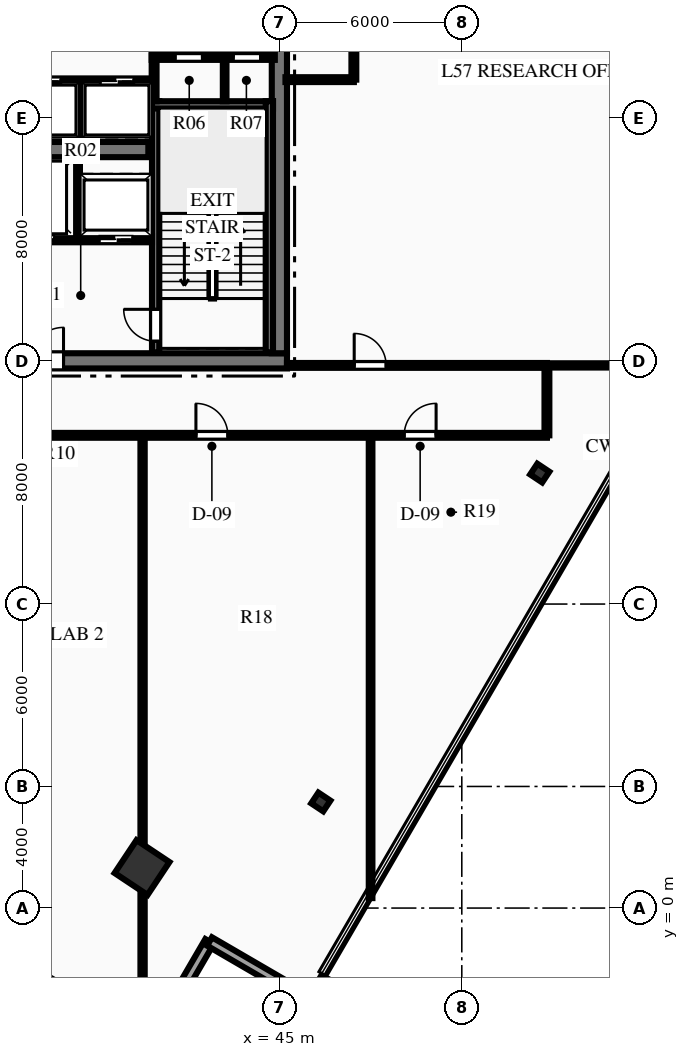
"""IFC4 building model, lengths in metres.
Left out: names, types, materials, properties, quantities, classifications, styles, units other than length and angle.
Written with IfcOpenShell. Run it as: python <this file> out.ifc"""

import sys

from ifc_helpers import new_model, si_unit, direction, frame, frame_2d, origin, origin_2d, place, context, subcontext, project, spatial, rectangle, hollow_rectangle, i_section, extrude, element, fill, save


model = new_model("IFC4")
c1 = context("Model", 3, precision=1e-05, world=origin(), true_north=direction((0.0, 1.0)))
c2 = subcontext(c1, "Body", "Model", "MODEL_VIEW")
j1 = project(units=[si_unit("LENGTHUNIT", "METRE"), si_unit("PLANEANGLEUNIT", "RADIAN")], contexts=[c1])
p1 = place(None, origin())
s1 = spatial("IfcSite", under=j1, at=p1, CompositionType="ELEMENT")
p2 = place(p1, origin())
s2 = spatial("IfcBuilding", under=s1, at=p2, CompositionType="ELEMENT")
p3 = place(p2, frame((0.0, 0.0, 228.45)))
s3 = spatial("IfcBuildingStorey", under=s2, at=p3, CompositionType="ELEMENT", Elevation=228.45)
p4 = place(p3, frame((26.75, 18.0, 0.0), z_axis=(0.0, 0.0, 1.0), x_axis=(1.0, 0.0, 0.0)))
e1 = element("IfcWall", 1, at=p4, inside=s3, PredefinedType="SHEAR", context=c2, shape_type="SweptSolid", body=[
    extrude(rectangle(XDim=18.5, YDim=0.5, at=frame_2d((9.25, 0.0))), origin(), (0.0, 0.0, 1.0), 3.75),
])
p5 = place(p4, frame((7.35, 0.0, 0.0)))
e2 = element("IfcOpeningElement", 2, at=p5, cuts=e1, PredefinedType="OPENING", context=c2, shape_type="SweptSolid", body=[
    extrude(rectangle(XDim=1.1, YDim=2.15, at=frame_2d((0.55, 1.075))), frame((0.0, 0.26, 0.0), z_axis=(0.0, -1.0, 0.0), x_axis=(1.0, 0.0, 0.0)), (0.0, 0.0, 1.0), 0.52),
])
p6 = place(p4, frame((10.05, 0.0, 0.0)))
e3 = element("IfcOpeningElement", 3, at=p6, cuts=e1, PredefinedType="OPENING", context=c2, shape_type="SweptSolid", body=[
    extrude(rectangle(XDim=1.1, YDim=2.15, at=frame_2d((0.55, 1.075))), frame((0.0, 0.26, 0.0), z_axis=(0.0, -1.0, 0.0), x_axis=(1.0, 0.0, 0.0)), (0.0, 0.0, 1.0), 0.52),
])
p7 = place(p3, frame((45.0, 18.25, 0.0), z_axis=(0.0, 0.0, 1.0), x_axis=(0.0, 1.0, 0.0)))
e4 = element("IfcWall", 4, at=p7, inside=s3, PredefinedType="SHEAR", context=c2, shape_type="SweptSolid", body=[
    extrude(rectangle(XDim=15.5, YDim=0.5, at=frame_2d((7.75, 0.0))), origin(), (0.0, 0.0, 1.0), 3.75),
])
p8 = place(p7, frame((9.99, 0.0, 0.0)))
e5 = element("IfcOpeningElement", 5, at=p8, cuts=e4, PredefinedType="OPENING", context=c2, shape_type="SweptSolid", body=[
    extrude(rectangle(XDim=1.4, YDim=2.2, at=frame_2d((0.7, 1.1))), frame((0.0, 0.26, 0.0), z_axis=(0.0, -1.0, 0.0), x_axis=(1.0, 0.0, 0.0)), (0.0, 0.0, 1.0), 0.52),
])
p9 = place(p3, frame((31.31, 24.95, 0.0), z_axis=(0.0, 0.0, 1.0), x_axis=(1.0, 0.0, 0.0)))
e6 = element("IfcWall", 6, at=p9, inside=s3, PredefinedType="SHEAR", context=c2, shape_type="SweptSolid", body=[
    extrude(rectangle(XDim=9.38, YDim=0.5, at=frame_2d((4.69, 0.0))), origin(), (0.0, 0.0, 1.0), 3.75),
])
p10 = place(p3, frame((40.93, 18.28, 0.0), z_axis=(0.0, 0.0, 1.0), x_axis=(0.0, 1.0, 0.0)))
e7 = element("IfcWall", 7, at=p10, inside=s3, PredefinedType="SHEAR", context=c2, shape_type="SweptSolid", body=[
    extrude(rectangle(XDim=8.26, YDim=0.24, at=frame_2d((4.13, 0.0))), origin(), (0.0, 0.0, 1.0), 3.75),
])
p11 = place(p10, frame((0.365, 0.0, 0.0)))
e8 = element("IfcOpeningElement", 8, at=p11, cuts=e7, PredefinedType="OPENING", context=c2, shape_type="SweptSolid", body=[
    extrude(rectangle(XDim=1.05, YDim=2.15, at=frame_2d((0.525, 1.075))), frame((0.0, 0.13, 0.0), z_axis=(0.0, -1.0, 0.0), x_axis=(1.0, 0.0, 0.0)), (0.0, 0.0, 1.0), 0.26),
])
p12 = place(p3, frame((40.81, 26.42, 0.0), z_axis=(0.0, 0.0, 1.0), x_axis=(1.0, 0.0, 0.0)))
e9 = element("IfcWall", 9, at=p12, inside=s3, PredefinedType="SHEAR", context=c2, shape_type="SweptSolid", body=[
    extrude(rectangle(XDim=3.98, YDim=0.24, at=frame_2d((1.99, 0.0))), origin(), (0.0, 0.0, 1.0), 3.75),
])
p13 = place(p3, frame((44.67, 18.28, 0.0), z_axis=(0.0, 0.0, 1.0), x_axis=(0.0, 1.0, 0.0)))
e10 = element("IfcWall", 10, at=p13, inside=s3, PredefinedType="SHEAR", context=c2, shape_type="SweptSolid", body=[
    extrude(rectangle(XDim=8.26, YDim=0.24, at=frame_2d((4.13, 0.0))), origin(), (0.0, 0.0, 1.0), 3.75),
])
p14 = place(p3, frame((40.483, 1.333, 0.0), z_axis=(0.0, 0.0, 1.0), x_axis=(0.554118199338, 0.832437998389, 0.0)))
e11 = element("IfcColumn", 11, at=p14, inside=s3, PredefinedType="COLUMN", context=c2, shape_type="SweptSolid", body=[
    extrude(hollow_rectangle(XDim=1.3, YDim=1.3, WallThickness=0.06, at=origin_2d()), origin(), (0.0, 0.0, 1.0), 3.75),
])
for number, where, z_axis, x_axis in (
    (12, (46.363, 3.49, 0.0), (0.0, 0.0, 1.0), (0.554, 0.832, 0.0)),
    (13, (53.564, 14.308, 0.0), (0.0, 0.0, 1.0), (0.554, 0.832, 0.0)),
):
    element("IfcColumn", number, at=place(p3, frame(where, z_axis=z_axis, x_axis=x_axis)), inside=s3, PredefinedType="COLUMN", context=c2, shape_type="SweptSolid", body=[
        extrude(i_section(OverallWidth=0.424, OverallDepth=0.474, WebThickness=0.048, FlangeThickness=0.077, at=origin_2d()), origin(), (0.0, 0.0, 1.0), 3.75),
    ])
p15 = place(p3, frame((46.526, -2.284, 0.0), z_axis=(0.0, 0.0, 1.0), x_axis=(-0.502959906984, -0.86430974307, 0.0)))
e14 = element("IfcWall", 14, at=p15, inside=s3, PredefinedType="STANDARD", context=c2, shape_type="SweptSolid", body=[
    extrude(rectangle(XDim=0.9, YDim=0.32, at=frame_2d((0.45, 0.0))), origin(), (0.0, 0.0, 1.0), 3.47),
])
p16 = place(p3, frame((42.703, -1.1, 0.0), z_axis=(0.0, 0.0, 1.0), x_axis=(-0.503006671867, -0.864282527914, 0.0)))
e15 = element("IfcWall", 15, at=p16, inside=s3, PredefinedType="STANDARD", context=c2, shape_type="SweptSolid", body=[
    extrude(rectangle(XDim=3.9, YDim=0.32, at=frame_2d((1.95, 0.0))), origin(), (0.0, 0.0, 1.0), 3.47),
])
p17 = place(p3, frame((46.074, -3.062, 0.0), z_axis=(0.0, 0.0, 1.0), x_axis=(-0.86427115238, 0.503026217174, 0.0)))
e16 = element("IfcWall", 16, at=p17, inside=s3, PredefinedType="STANDARD", context=c2, shape_type="SweptSolid", body=[
    extrude(rectangle(XDim=3.9, YDim=0.32, at=frame_2d((1.95, 0.0))), origin(), (0.0, 0.0, 1.0), 3.47),
])
p18 = place(p3, frame((36.12, 22.0, 0.0), z_axis=(0.0, 0.0, 1.0), x_axis=(1.0, 0.0, 0.0)))
e17 = element("IfcWall", 17, at=p18, inside=s3, PredefinedType="PARTITIONING", context=c2, shape_type="SweptSolid", body=[
    extrude(rectangle(XDim=4.69, YDim=0.2, at=frame_2d((2.345, 0.0))), origin(), (0.0, 0.0, 1.0), 3.47),
])
p19 = place(p18, frame((2.955, 0.0, 0.0)))
e18 = element("IfcOpeningElement", 18, at=p19, cuts=e17, PredefinedType="OPENING", context=c2, shape_type="SweptSolid", body=[
    extrude(rectangle(XDim=1.1, YDim=2.15, at=frame_2d((0.55, 1.075))), frame((0.0, 0.11, 0.0), z_axis=(0.0, -1.0, 0.0), x_axis=(1.0, 0.0, 0.0)), (0.0, 0.0, 1.0), 0.22),
])
p20 = place(p18, frame((0.08, 0.0, 0.0)))
e19 = element("IfcOpeningElement", 19, at=p20, cuts=e17, PredefinedType="OPENING", context=c2, shape_type="SweptSolid", body=[
    extrude(rectangle(XDim=1.4, YDim=2.2, at=frame_2d((0.7, 1.1))), frame((0.0, 0.11, 0.0), z_axis=(0.0, -1.0, 0.0), x_axis=(1.0, 0.0, 0.0)), (0.0, 0.0, 1.0), 0.22),
])
p21 = place(p3, frame((38.35, 22.05, 0.0), z_axis=(0.0, 0.0, 1.0), x_axis=(0.0, 1.0, 0.0)))
e20 = element("IfcWall", 20, at=p21, inside=s3, PredefinedType="PARTITIONING", context=c2, shape_type="SweptSolid", body=[
    extrude(rectangle(XDim=2.6, YDim=0.18, at=frame_2d((1.3, 0.0))), origin(), (0.0, 0.0, 1.0), 3.47),
])
p22 = place(p3, frame((40.8, 27.98, 0.0), z_axis=(0.0, 0.0, 1.0), x_axis=(1.0, 0.0, 0.0)))
e21 = element("IfcWall", 21, at=p22, inside=s3, PredefinedType="PARTITIONING", context=c2, shape_type="SweptSolid", body=[
    extrude(rectangle(XDim=4.05, YDim=0.16, at=frame_2d((2.025, 0.0))), origin(), (0.0, 0.0, 1.0), 3.47),
])
p23 = place(p22, frame((0.77, 0.0, 0.0)))
e22 = element("IfcOpeningElement", 22, at=p23, cuts=e21, PredefinedType="OPENING", context=c2, shape_type="SweptSolid", body=[
    extrude(rectangle(XDim=0.9, YDim=2.15, at=frame_2d((0.45, 1.075))), frame((0.0, 0.09, 0.0), z_axis=(0.0, -1.0, 0.0), x_axis=(1.0, 0.0, 0.0)), (0.0, 0.0, 1.0), 0.18),
])
p24 = place(p22, frame((2.68, 0.0, 0.0)))
e23 = element("IfcOpeningElement", 23, at=p24, cuts=e21, PredefinedType="OPENING", context=c2, shape_type="SweptSolid", body=[
    extrude(rectangle(XDim=0.9, YDim=2.15, at=frame_2d((0.45, 1.075))), frame((0.0, 0.09, 0.0), z_axis=(0.0, -1.0, 0.0), x_axis=(1.0, 0.0, 0.0)), (0.0, 0.0, 1.0), 0.18),
])
p25 = place(p3, frame((40.88, 26.54, 0.0), z_axis=(0.0, 0.0, 1.0), x_axis=(0.0, 1.0, 0.0)))
e24 = element("IfcWall", 24, at=p25, inside=s3, PredefinedType="PARTITIONING", context=c2, shape_type="SweptSolid", body=[
    extrude(rectangle(XDim=1.51, YDim=0.16, at=frame_2d((0.755, 0.0))), origin(), (0.0, 0.0, 1.0), 3.47),
])
p26 = place(p3, frame((43.2, 26.54, 0.0), z_axis=(0.0, 0.0, 1.0), x_axis=(0.0, 1.0, 0.0)))
e25 = element("IfcWall", 25, at=p26, inside=s3, PredefinedType="PARTITIONING", context=c2, shape_type="SweptSolid", body=[
    extrude(rectangle(XDim=1.44, YDim=0.12, at=frame_2d((0.72, 0.0))), origin(), (0.0, 0.0, 1.0), 3.47),
])
p27 = place(p3, frame((31.2, 27.2, 0.0), z_axis=(0.0, 0.0, 1.0), x_axis=(1.0, 0.0, 0.0)))
e26 = element("IfcWall", 26, at=p27, inside=s3, PredefinedType="PARTITIONING", context=c2, shape_type="SweptSolid", body=[
    extrude(rectangle(XDim=9.6, YDim=0.18, at=frame_2d((4.8, 0.0))), origin(), (0.0, 0.0, 1.0), 3.47),
])
p28 = place(p27, frame((0.59, 0.0, 0.0)))
e27 = element("IfcOpeningElement", 27, at=p28, cuts=e26, PredefinedType="OPENING", context=c2, shape_type="SweptSolid", body=[
    extrude(rectangle(XDim=1.1, YDim=2.15, at=frame_2d((0.55, 1.075))), frame((0.0, 0.1, 0.0), z_axis=(0.0, -1.0, 0.0), x_axis=(1.0, 0.0, 0.0)), (0.0, 0.0, 1.0), 0.2),
])
p29 = place(p27, frame((2.99, 0.0, 0.0)))
e28 = element("IfcOpeningElement", 28, at=p29, cuts=e26, PredefinedType="OPENING", context=c2, shape_type="SweptSolid", body=[
    extrude(rectangle(XDim=1.1, YDim=2.15, at=frame_2d((0.55, 1.075))), frame((0.0, 0.1, 0.0), z_axis=(0.0, -1.0, 0.0), x_axis=(1.0, 0.0, 0.0)), (0.0, 0.0, 1.0), 0.2),
])
p30 = place(p27, frame((5.51, 0.0, 0.0)))
e29 = element("IfcOpeningElement", 29, at=p30, cuts=e26, PredefinedType="OPENING", context=c2, shape_type="SweptSolid", body=[
    extrude(rectangle(XDim=1.1, YDim=2.15, at=frame_2d((0.55, 1.075))), frame((0.0, 0.1, 0.0), z_axis=(0.0, -1.0, 0.0), x_axis=(1.0, 0.0, 0.0)), (0.0, 0.0, 1.0), 0.2),
])
p31 = place(p27, frame((7.91, 0.0, 0.0)))
e30 = element("IfcOpeningElement", 30, at=p31, cuts=e26, PredefinedType="OPENING", context=c2, shape_type="SweptSolid", body=[
    extrude(rectangle(XDim=1.1, YDim=2.15, at=frame_2d((0.55, 1.075))), frame((0.0, 0.1, 0.0), z_axis=(0.0, -1.0, 0.0), x_axis=(1.0, 0.0, 0.0)), (0.0, 0.0, 1.0), 0.2),
])
p32 = place(p3, frame((38.46, 25.3, 0.0), z_axis=(0.0, 0.0, 1.0), x_axis=(0.0, 1.0, 0.0)))
e31 = element("IfcWall", 31, at=p32, inside=s3, PredefinedType="PARTITIONING", context=c2, shape_type="SweptSolid", body=[
    extrude(rectangle(XDim=1.9, YDim=0.18, at=frame_2d((0.95, 0.0))), origin(), (0.0, 0.0, 1.0), 3.47),
])
p33 = place(p3, frame((18.2, 15.55, 0.0), z_axis=(0.0, 0.0, 1.0), x_axis=(1.0, 0.0, 0.0)))
e32 = element("IfcWall", 32, at=p33, inside=s3, PredefinedType="PARTITIONING", context=c2, shape_type="SweptSolid", body=[
    extrude(rectangle(XDim=35.6, YDim=0.16, at=frame_2d((17.8, 0.0))), origin(), (0.0, 0.0, 1.0), 3.008),
])
p34 = place(p33, frame((3.587, 0.0, 0.0)))
e33 = element("IfcOpeningElement", 33, at=p34, cuts=e32, PredefinedType="OPENING", context=c2, shape_type="SweptSolid", body=[
    extrude(rectangle(XDim=1.05, YDim=2.15, at=frame_2d((0.525, 1.075))), frame((0.0, 0.09, 0.0), z_axis=(0.0, -1.0, 0.0), x_axis=(1.0, 0.0, 0.0)), (0.0, 0.0, 1.0), 0.18),
])
p35 = place(p33, frame((16.775, 0.0, 0.0)))
e34 = element("IfcOpeningElement", 34, at=p35, cuts=e32, PredefinedType="OPENING", context=c2, shape_type="SweptSolid", body=[
    extrude(rectangle(XDim=1.05, YDim=2.15, at=frame_2d((0.525, 1.075))), frame((0.0, 0.09, 0.0), z_axis=(0.0, -1.0, 0.0), x_axis=(1.0, 0.0, 0.0)), (0.0, 0.0, 1.0), 0.18),
])
p36 = place(p33, frame((24.055, 0.0, 0.0)))
e35 = element("IfcOpeningElement", 35, at=p36, cuts=e32, PredefinedType="OPENING", context=c2, shape_type="SweptSolid", body=[
    extrude(rectangle(XDim=1.05, YDim=2.15, at=frame_2d((0.525, 1.075))), frame((0.0, 0.09, 0.0), z_axis=(0.0, -1.0, 0.0), x_axis=(1.0, 0.0, 0.0)), (0.0, 0.0, 1.0), 0.18),
])
p37 = place(p33, frame((30.905, 0.0, 0.0)))
e36 = element("IfcOpeningElement", 36, at=p37, cuts=e32, PredefinedType="OPENING", context=c2, shape_type="SweptSolid", body=[
    extrude(rectangle(XDim=1.05, YDim=2.15, at=frame_2d((0.525, 1.075))), frame((0.0, 0.09, 0.0), z_axis=(0.0, -1.0, 0.0), x_axis=(1.0, 0.0, 0.0)), (0.0, 0.0, 1.0), 0.18),
])
p38 = place(p3, frame((45.25, 17.85, 0.0), z_axis=(0.0, 0.0, 1.0), x_axis=(1.0, 0.0, 0.0)))
e37 = element("IfcWall", 37, at=p38, inside=s3, PredefinedType="PARTITIONING", context=c2, shape_type="SweptSolid", body=[
    extrude(rectangle(XDim=8.55, YDim=0.16, at=frame_2d((4.275, 0.0))), origin(), (0.0, 0.0, 1.0), 3.47),
])
p39 = place(p38, frame((2.211, 0.0, 0.0)))
e38 = element("IfcOpeningElement", 38, at=p39, cuts=e37, PredefinedType="OPENING", context=c2, shape_type="SweptSolid", body=[
    extrude(rectangle(XDim=1.05, YDim=2.15, at=frame_2d((0.525, 1.075))), frame((0.0, 0.09, 0.0), z_axis=(0.0, -1.0, 0.0), x_axis=(1.0, 0.0, 0.0)), (0.0, 0.0, 1.0), 0.18),
])
p40 = place(p3, frame((47.45, 27.25, 0.0), z_axis=(0.0, 0.0, 1.0), x_axis=(0.0, 1.0, 0.0)))
e39 = element("IfcWall", 39, at=p40, inside=s3, PredefinedType="PARTITIONING", context=c2, shape_type="SweptSolid", body=[
    extrude(rectangle(XDim=6.9, YDim=0.16, at=frame_2d((3.45, 0.0))), origin(), (0.0, 0.0, 1.0), 3.47),
])
p41 = place(p3, frame((45.2, 27.25, 0.0), z_axis=(0.0, 0.0, 1.0), x_axis=(1.0, 0.0, 0.0)))
e40 = element("IfcWall", 40, at=p41, inside=s3, PredefinedType="PARTITIONING", context=c2, shape_type="SweptSolid", body=[
    extrude(rectangle(XDim=2.25, YDim=0.16, at=frame_2d((1.125, 0.0))), origin(), (0.0, 0.0, 1.0), 3.47),
])
p42 = place(p3, frame((53.8, 15.55, 0.0), z_axis=(0.0, 0.0, 1.0), x_axis=(0.0, 1.0, 0.0)))
e41 = element("IfcWall", 41, at=p42, inside=s3, PredefinedType="PARTITIONING", context=c2, shape_type="SweptSolid", body=[
    extrude(rectangle(XDim=2.3, YDim=0.16, at=frame_2d((1.15, 0.0))), origin(), (0.0, 0.0, 1.0), 3.47),
])
p43 = place(p3, frame((53.8, 17.85, 0.0), z_axis=(0.0, 0.0, 1.0), x_axis=(1.0, 0.0, 0.0)))
e42 = element("IfcWall", 42, at=p43, inside=s3, PredefinedType="PARTITIONING", context=c2, shape_type="SweptSolid", body=[
    extrude(rectangle(XDim=4.398, YDim=0.14, at=frame_2d((2.199, 0.0))), origin(), (0.0, 0.0, 1.0), 3.47),
])
p44 = place(p3, frame((40.5, -4.284, 0.0), z_axis=(0.0, 0.0, 1.0), x_axis=(0.0, 1.0, 0.0)))
e43 = element("IfcWall", 43, at=p44, inside=s3, PredefinedType="PARTITIONING", context=c2, shape_type="SweptSolid", body=[
    extrude(rectangle(XDim=19.834, YDim=0.14, at=frame_2d((9.917, 0.0))), origin(), (0.0, 0.0, 1.0), 2.849),
])
p45 = place(p3, frame((48.0, 0.327, 0.0), z_axis=(0.0, 0.0, 1.0), x_axis=(0.0, 1.0, 0.0)))
e44 = element("IfcWall", 44, at=p45, inside=s3, PredefinedType="PARTITIONING", context=c2, shape_type="SweptSolid", body=[
    extrude(rectangle(XDim=15.223, YDim=0.12, at=frame_2d((7.611, 0.0))), origin(), (0.0, 0.0, 1.0), 3.47),
])
p46 = place(p23, origin())
e45 = element("IfcDoor", 45, at=p46, inside=s3, OperationType="SINGLE_SWING_RIGHT", PredefinedType="DOOR", context=c2, shape_type="SweptSolid", body=[
    extrude(rectangle(XDim=0.9, YDim=2.15, at=frame_2d((0.45, 1.075))), frame((0.0, 0.025, 0.0), z_axis=(0.0, -1.0, 0.0), x_axis=(1.0, 0.0, 0.0)), (0.0, 0.0, 1.0), 0.05),
])
fill(e22, e45)
p47 = place(p24, origin())
e46 = element("IfcDoor", 46, at=p47, inside=s3, OperationType="SINGLE_SWING_LEFT", PredefinedType="DOOR", context=c2, shape_type="SweptSolid", body=[
    extrude(rectangle(XDim=0.9, YDim=2.15, at=frame_2d((0.45, 1.075))), frame((0.0, 0.025, 0.0), z_axis=(0.0, -1.0, 0.0), x_axis=(1.0, 0.0, 0.0)), (0.0, 0.0, 1.0), 0.05),
])
fill(e23, e46)
p48 = place(p11, origin())
e47 = element("IfcDoor", 47, at=p48, inside=s3, OperationType="SINGLE_SWING_RIGHT", PredefinedType="DOOR", context=c2, shape_type="SweptSolid", body=[
    extrude(rectangle(XDim=1.05, YDim=2.15, at=frame_2d((0.525, 1.075))), frame((0.0, 0.025, 0.0), z_axis=(0.0, -1.0, 0.0), x_axis=(1.0, 0.0, 0.0)), (0.0, 0.0, 1.0), 0.05),
])
fill(e8, e47)
p49 = place(p6, origin())
e48 = element("IfcDoor", 48, at=p49, inside=s3, OperationType="SINGLE_SWING_RIGHT", PredefinedType="DOOR", context=c2, shape_type="SweptSolid", body=[
    extrude(rectangle(XDim=1.1, YDim=2.15, at=frame_2d((0.55, 1.075))), frame((0.0, 0.025, 0.0), z_axis=(0.0, -1.0, 0.0), x_axis=(1.0, 0.0, 0.0)), (0.0, 0.0, 1.0), 0.05),
])
fill(e3, e48)
p50 = place(p36, origin())
e49 = element("IfcDoor", 49, at=p50, inside=s3, OperationType="SINGLE_SWING_LEFT", PredefinedType="DOOR", context=c2, shape_type="SweptSolid", body=[
    extrude(rectangle(XDim=1.05, YDim=2.15, at=frame_2d((0.525, 1.075))), frame((0.0, 0.025, 0.0), z_axis=(0.0, -1.0, 0.0), x_axis=(1.0, 0.0, 0.0)), (0.0, 0.0, 1.0), 0.05),
])
fill(e35, e49)
p51 = place(p37, origin())
e50 = element("IfcDoor", 50, at=p51, inside=s3, OperationType="SINGLE_SWING_RIGHT", PredefinedType="DOOR", context=c2, shape_type="SweptSolid", body=[
    extrude(rectangle(XDim=1.05, YDim=2.15, at=frame_2d((0.525, 1.075))), frame((0.0, 0.025, 0.0), z_axis=(0.0, -1.0, 0.0), x_axis=(1.0, 0.0, 0.0)), (0.0, 0.0, 1.0), 0.05),
])
fill(e36, e50)
p52 = place(p39, origin())
e51 = element("IfcDoor", 51, at=p52, inside=s3, OperationType="SINGLE_SWING_LEFT", PredefinedType="DOOR", context=c2, shape_type="SweptSolid", body=[
    extrude(rectangle(XDim=1.05, YDim=2.15, at=frame_2d((0.525, 1.075))), frame((0.0, 0.025, 0.0), z_axis=(0.0, -1.0, 0.0), x_axis=(1.0, 0.0, 0.0)), (0.0, 0.0, 1.0), 0.05),
])
fill(e38, e51)
p53 = place(p30, origin())
e52 = element("IfcDoor", 52, at=p53, inside=s3, OperationType="SLIDING_TO_LEFT", PredefinedType="DOOR", context=c2, shape_type="SweptSolid", body=[
    extrude(rectangle(XDim=1.1, YDim=2.15, at=frame_2d((0.55, 1.075))), frame((0.0, 0.025, 0.0), z_axis=(0.0, -1.0, 0.0), x_axis=(1.0, 0.0, 0.0)), (0.0, 0.0, 1.0), 0.05),
])
fill(e29, e52)
p54 = place(p31, origin())
e53 = element("IfcDoor", 53, at=p54, inside=s3, OperationType="SLIDING_TO_LEFT", PredefinedType="DOOR", context=c2, shape_type="SweptSolid", body=[
    extrude(rectangle(XDim=1.1, YDim=2.15, at=frame_2d((0.55, 1.075))), frame((0.0, 0.025, 0.0), z_axis=(0.0, -1.0, 0.0), x_axis=(1.0, 0.0, 0.0)), (0.0, 0.0, 1.0), 0.05),
])
fill(e30, e53)
p55 = place(p19, origin())
e54 = element("IfcDoor", 54, at=p55, inside=s3, OperationType="SLIDING_TO_LEFT", PredefinedType="DOOR", context=c2, shape_type="SweptSolid", body=[
    extrude(rectangle(XDim=1.1, YDim=2.15, at=frame_2d((0.55, 1.075))), frame((0.0, 0.025, 0.0), z_axis=(0.0, -1.0, 0.0), x_axis=(1.0, 0.0, 0.0)), (0.0, 0.0, 1.0), 0.05),
])
fill(e18, e54)
p56 = place(p20, origin())
e55 = element("IfcDoor", 55, at=p56, inside=s3, OperationType="SLIDING_TO_LEFT", PredefinedType="DOOR", context=c2, shape_type="SweptSolid", body=[
    extrude(rectangle(XDim=1.4, YDim=2.2, at=frame_2d((0.7, 1.1))), frame((0.0, 0.025, 0.0), z_axis=(0.0, -1.0, 0.0), x_axis=(1.0, 0.0, 0.0)), (0.0, 0.0, 1.0), 0.05),
])
fill(e19, e55)
save(model, sys.argv[1])
